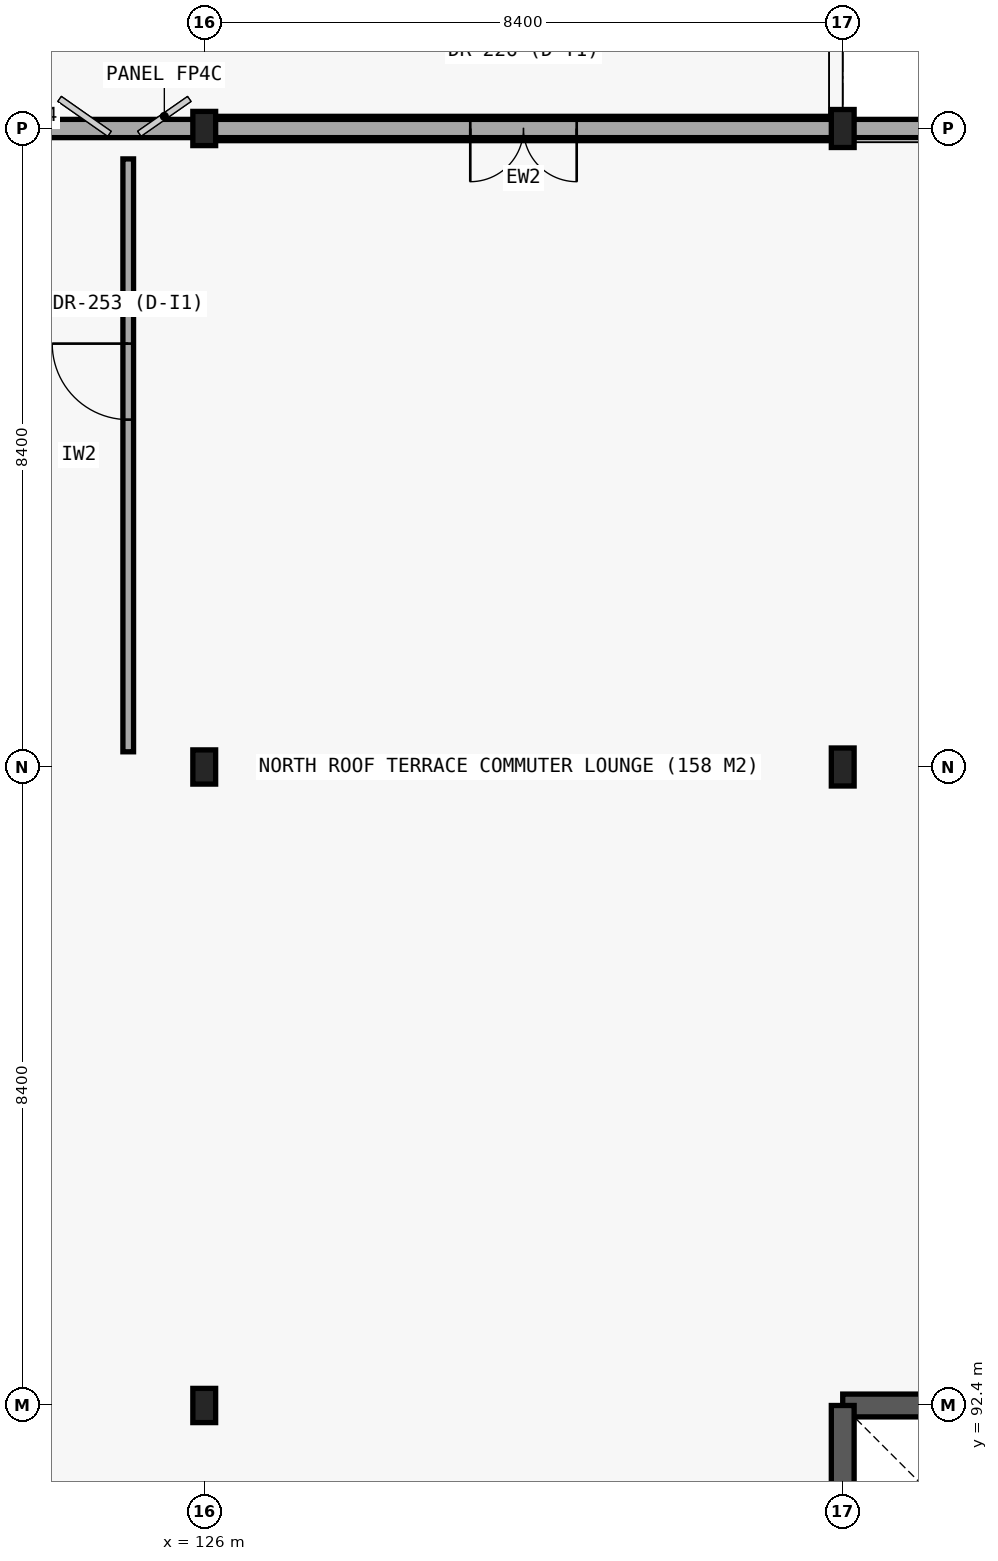
"""IFC4 building model, lengths in metres.
Left out: names, types, materials, properties, quantities, classifications, styles, units other than length and angle.
Written with IfcOpenShell. Run it as: python <this file> out.ifc"""

import sys

from ifc_helpers import new_model, si_unit, direction, frame, frame_2d, origin, origin_2d, place, context, subcontext, project, spatial, rectangle, i_section, extrude, element, fill, save


model = new_model("IFC4")
c1 = context("Model", 3, precision=1e-05, world=origin(), true_north=direction((0.0, 1.0)))
c2 = subcontext(c1, "Body", "Model", "MODEL_VIEW")
j1 = project(units=[si_unit("LENGTHUNIT", "METRE"), si_unit("PLANEANGLEUNIT", "RADIAN")], contexts=[c1])
p1 = place(None, origin())
s1 = spatial("IfcSite", under=j1, at=p1, CompositionType="ELEMENT")
p2 = place(p1, origin())
s2 = spatial("IfcBuilding", under=s1, at=p2, CompositionType="ELEMENT")
p3 = place(p2, frame((0.0, 0.0, 17.4)))
s3 = spatial("IfcBuildingStorey", under=s2, at=p3, CompositionType="ELEMENT", Elevation=17.4)
p4 = place(p3, frame((142.8, 92.4, 0.0), z_axis=(0.0, 0.0, 1.0), x_axis=(-1.0, 0.0, 0.0)))
e1 = element("IfcWall", 1, at=p4, inside=s3, PredefinedType="SHEAR", context=c2, shape_type="SweptSolid", body=[
    extrude(rectangle(XDim=8.4, YDim=0.3, at=frame_2d((4.2, 0.0))), origin(), (0.0, 0.0, 1.0), 4.2),
])
p5 = place(p3, frame((134.4, 92.4, 0.0), z_axis=(0.0, 0.0, 1.0), x_axis=(0.0, -1.0, 0.0)))
e2 = element("IfcWall", 2, at=p5, inside=s3, PredefinedType="SHEAR", context=c2, shape_type="SweptSolid", body=[
    extrude(rectangle(XDim=8.4, YDim=0.3, at=frame_2d((4.2, 0.0))), origin(), (0.0, 0.0, 1.0), 4.2),
])
for number, where, z_axis, x_axis in (
    (3, (126.0, 92.4, 0.0), (0.0, 0.0, 1.0), (1.0, 0.0, 0.0)),
    (4, (126.0, 100.8, 0.0), (0.0, 0.0, 1.0), (1.0, 0.0, 0.0)),
    (5, (126.0, 109.2, 0.0), (0.0, 0.0, 1.0), (1.0, 0.0, 0.0)),
):
    element("IfcColumn", number, at=place(p3, frame(where, z_axis=z_axis, x_axis=x_axis)), inside=s3, PredefinedType="COLUMN", context=c2, shape_type="SweptSolid", body=[
        extrude(i_section(OverallWidth=0.3, OverallDepth=0.45, WebThickness=0.014, FlangeThickness=0.026, FilletRadius=0.027, at=origin_2d()), origin(), (0.0, 0.0, 1.0), 3.71),
    ])
for number, where, z_axis, x_axis in (
    (6, (134.4, 100.8, 0.0), (0.0, 0.0, 1.0), (1.0, 0.0, 0.0)),
    (7, (134.4, 109.2, 0.0), (0.0, 0.0, 1.0), (1.0, 0.0, 0.0)),
):
    element("IfcColumn", number, at=place(p3, frame(where, z_axis=z_axis, x_axis=x_axis)), inside=s3, PredefinedType="COLUMN", context=c2, shape_type="SweptSolid", body=[
        extrude(i_section(OverallWidth=0.3, OverallDepth=0.5, WebThickness=0.014, FlangeThickness=0.028, FilletRadius=0.027, at=origin_2d()), origin(), (0.0, 0.0, 1.0), 3.71),
    ])
p6 = place(p3, frame((134.4, 109.2, 0.0), z_axis=(0.0, 0.0, 1.0), x_axis=(-1.0, 0.0, 0.0)))
e8 = element("IfcWall", 8, at=p6, inside=s3, PredefinedType="STANDARD", context=c2, shape_type="SweptSolid", body=[
    extrude(rectangle(XDim=8.4, YDim=0.32, at=frame_2d((4.2, 0.0))), origin(), (0.0, 0.0, 1.0), 3.26),
])
p7 = place(p6, frame((3.5, 0.0, 0.0)))
e9 = element("IfcOpeningElement", 9, at=p7, cuts=e8, PredefinedType="OPENING", context=c2, shape_type="SweptSolid", body=[
    extrude(rectangle(XDim=1.4, YDim=2.3, at=frame_2d((0.7, 1.15))), frame((0.0, 0.17, 0.0), z_axis=(0.0, -1.0, 0.0), x_axis=(1.0, 0.0, 0.0)), (0.0, 0.0, 1.0), 0.34),
])
p8 = place(p3, frame((100.8, 109.2, 3.9), z_axis=(0.0, 0.0, 1.0), x_axis=(1.0, 0.0, 0.0)))
e10 = element("IfcWall", 10, at=p8, inside=s3, PredefinedType="PARAPET", context=c2, shape_type="SweptSolid", body=[
    extrude(rectangle(XDim=42.0, YDim=0.24, at=frame_2d((21.0, 0.0))), origin(), (0.0, 0.0, 1.0), 0.95),
])
p9 = place(p3, frame((125.0, 101.0, 0.0), z_axis=(0.0, 0.0, 1.0), x_axis=(0.0, 1.0, 0.0)))
e11 = element("IfcWall", 11, at=p9, inside=s3, PredefinedType="PARTITIONING", context=c2, shape_type="SweptSolid", body=[
    extrude(rectangle(XDim=7.8, YDim=0.14, at=frame_2d((3.9, 0.0))), origin(), (0.0, 0.0, 1.0), 3.5),
])
p10 = place(p9, frame((4.37, 0.0, 0.0)))
e12 = element("IfcOpeningElement", 12, at=p10, cuts=e11, PredefinedType="OPENING", context=c2, shape_type="SweptSolid", body=[
    extrude(rectangle(XDim=1.0, YDim=2.15, at=frame_2d((0.5, 1.075))), frame((0.0, 0.08, 0.0), z_axis=(0.0, -1.0, 0.0), x_axis=(1.0, 0.0, 0.0)), (0.0, 0.0, 1.0), 0.16),
])
p11 = place(p7, origin())
e13 = element("IfcDoor", 13, at=p11, inside=s3, OperationType="DOUBLE_DOOR_SINGLE_SWING", PredefinedType="DOOR", context=c2, shape_type="SweptSolid", body=[
    extrude(rectangle(XDim=1.4, YDim=2.3, at=frame_2d((0.7, 1.15))), frame((0.0, 0.025, 0.0), z_axis=(0.0, -1.0, 0.0), x_axis=(1.0, 0.0, 0.0)), (0.0, 0.0, 1.0), 0.05),
])
fill(e9, e13)
p12 = place(p10, origin())
e14 = element("IfcDoor", 14, at=p12, inside=s3, OperationType="SINGLE_SWING_RIGHT", PredefinedType="DOOR", context=c2, shape_type="SweptSolid", body=[
    extrude(rectangle(XDim=1.0, YDim=2.15, at=frame_2d((0.5, 1.075))), frame((0.0, 0.025, 0.0), z_axis=(0.0, -1.0, 0.0), x_axis=(1.0, 0.0, 0.0)), (0.0, 0.0, 1.0), 0.05),
])
fill(e12, e14)
save(model, sys.argv[1])
